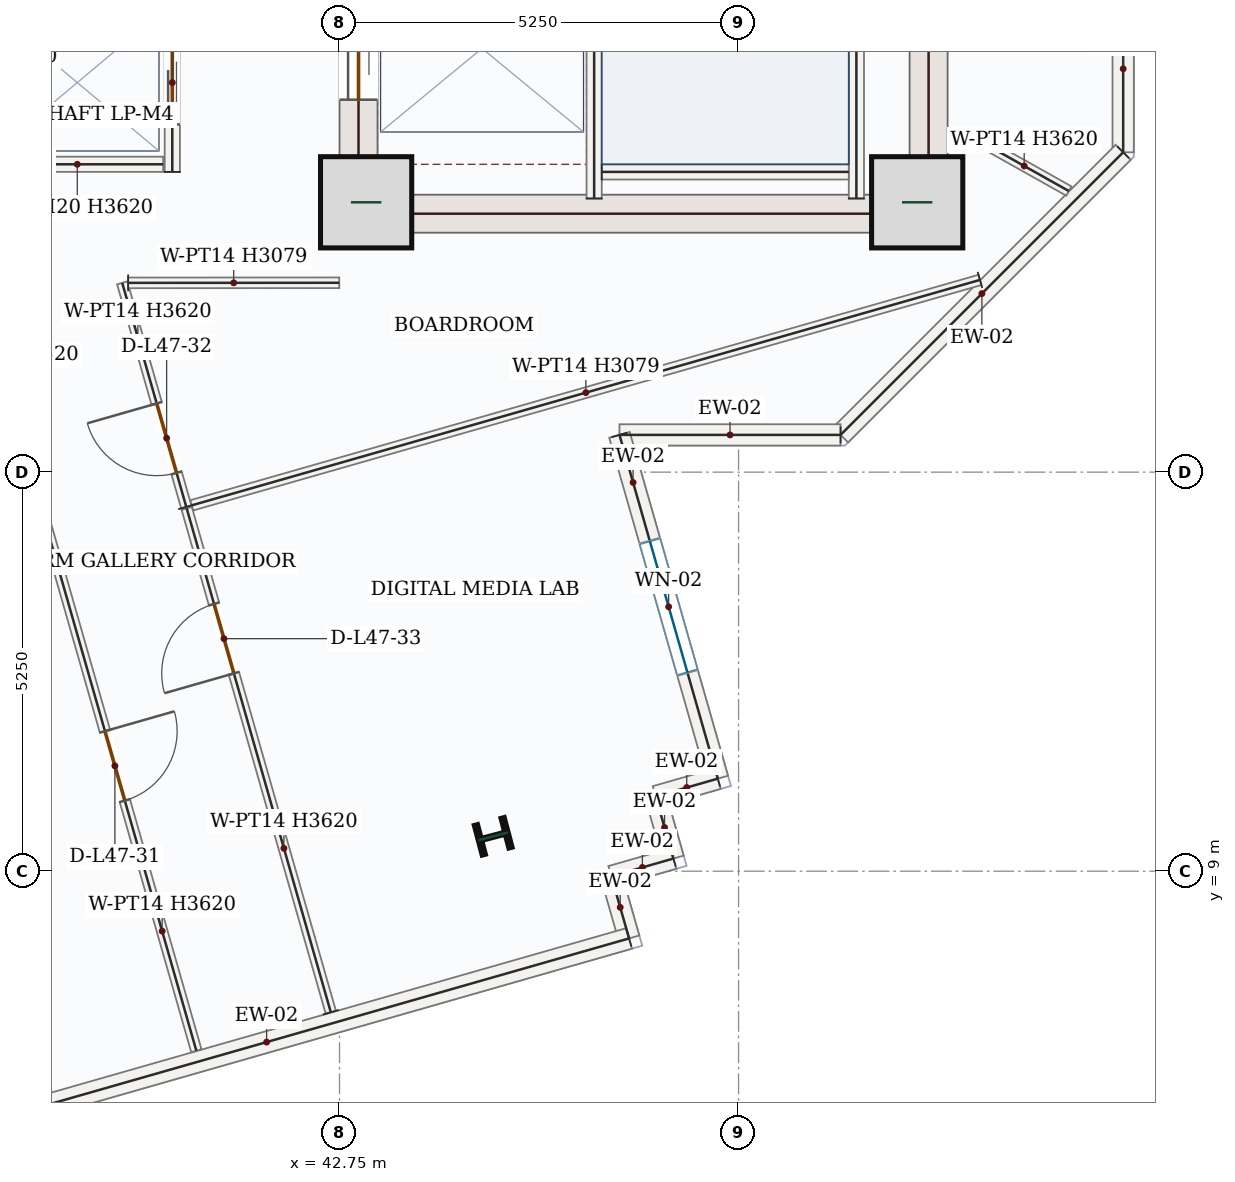
"""IFC4 building model, lengths in metres.
Left out: names, types, materials, properties, quantities, classifications, styles, units other than length and angle.
Written with IfcOpenShell. Run it as: python <this file> out.ifc"""

import sys

from ifc_helpers import new_model, si_unit, direction, frame, frame_2d, origin, origin_2d, place, context, subcontext, project, spatial, rectangle, i_section, extrude, source, transform, mapped, element, fill, save


model = new_model("IFC4")
c1 = context("Model", 3, precision=1e-05, world=origin(), true_north=direction((0.0, 1.0)))
c2 = subcontext(c1, "Body", "Model", "MODEL_VIEW")
j1 = project(units=[si_unit("LENGTHUNIT", "METRE"), si_unit("PLANEANGLEUNIT", "RADIAN")], contexts=[c1])
p1 = place(None, origin())
s1 = spatial("IfcSite", under=j1, at=p1, CompositionType="ELEMENT")
p2 = place(p1, origin())
s2 = spatial("IfcBuilding", under=s1, at=p2, CompositionType="ELEMENT")
p3 = place(p2, frame((0.0, 0.0, 201.9)))
s3 = spatial("IfcBuildingStorey", under=s2, at=p3, CompositionType="ELEMENT", Elevation=201.9)
p4 = place(p3, frame((43.0, 17.4, 0.0), z_axis=(0.0, 0.0, 1.0), x_axis=(0.0, 1.0, 0.0)))
e1 = element("IfcWall", 1, at=p4, inside=s3, PredefinedType="SHEAR", context=c2, shape_type="SweptSolid", body=[
    extrude(rectangle(XDim=8.55, YDim=0.5, at=frame_2d((4.275, 0.0))), origin(), (0.0, 0.0, 1.0), 3.62),
])
p5 = place(p4, frame((6.65, 0.0, 0.0)))
e2 = element("IfcOpeningElement", 2, at=p5, cuts=e1, PredefinedType="OPENING", context=c2, shape_type="SweptSolid", body=[
    extrude(rectangle(XDim=1.1, YDim=2.2, at=frame_2d((0.55, 1.1))), frame((0.0, 0.26, 0.0), z_axis=(0.0, -1.0, 0.0), x_axis=(1.0, 0.0, 0.0)), (0.0, 0.0, 1.0), 0.52),
])
p6 = place(p4, frame((1.75, 0.0, 0.0)))
e3 = element("IfcOpeningElement", 3, at=p6, cuts=e1, PredefinedType="OPENING", context=c2, shape_type="SweptSolid", body=[
    extrude(rectangle(XDim=1.3, YDim=2.2, at=frame_2d((0.65, 1.1))), frame((0.0, 0.26, 0.0), z_axis=(0.0, -1.0, 0.0), x_axis=(1.0, 0.0, 0.0)), (0.0, 0.0, 1.0), 0.52),
])
p7 = place(p4, frame((4.3, 0.0, 0.0)))
e4 = element("IfcOpeningElement", 4, at=p7, cuts=e1, PredefinedType="OPENING", context=c2, shape_type="SweptSolid", body=[
    extrude(rectangle(XDim=0.88, YDim=2.1, at=frame_2d((0.44, 1.05))), frame((0.0, 0.26, 0.0), z_axis=(0.0, -1.0, 0.0), x_axis=(1.0, 0.0, 0.0)), (0.0, 0.0, 1.0), 0.52),
])
m1 = source(origin(), c2, "Body", "SweptSolid", [
    extrude(rectangle(XDim=8.55, YDim=0.5, at=frame_2d((4.275, 0.0))), origin(), (0.0, 0.0, 1.0), 3.62),
])
p8 = place(p3, frame((50.5, 17.4, 0.0), z_axis=(0.0, 0.0, 1.0), x_axis=(0.0, 1.0, 0.0)))
e5 = element("IfcWall", 5, at=p8, inside=s3, PredefinedType="SHEAR", context=c2, shape_type="MappedRepresentation", body=[
    mapped(m1, transform((0.0, 0.0, 0.0), x_axis=(1.0, 0.0, 0.0), y_axis=(0.0, 1.0, 0.0), z_axis=(0.0, 0.0, 1.0), scale=1.0)),
])
m2 = source(origin(), c2, "Body", "SweptSolid", [
    extrude(rectangle(XDim=7.0, YDim=0.5, at=frame_2d((3.5, 0.0))), origin(), (0.0, 0.0, 1.0), 3.62),
])
p9 = place(p3, frame((43.25, 17.65, 0.0), z_axis=(0.0, 0.0, 1.0), x_axis=(1.0, 0.0, 0.0)))
e6 = element("IfcWall", 6, at=p9, inside=s3, PredefinedType="SHEAR", context=c2, shape_type="MappedRepresentation", body=[
    mapped(m2, transform((0.0, 0.0, 0.0), x_axis=(1.0, 0.0, 0.0), y_axis=(0.0, 1.0, 0.0), z_axis=(0.0, 0.0, 1.0), scale=1.0)),
])
m3 = source(origin(), c2, "Body", "SweptSolid", [
    extrude(rectangle(XDim=1.2, YDim=1.2, at=origin_2d()), origin(), (0.0, 0.0, 1.0), 3.9),
])
for number, where, z_axis, x_axis in (
    (7, (43.1, 17.8, 0.0), (0.0, 0.0, 1.0), (1.0, 0.0, 0.0)),
    (8, (50.35, 17.8, 0.0), (0.0, 0.0, 1.0), (1.0, 0.0, 0.0)),
):
    element("IfcColumn", number, at=place(p3, frame(where, z_axis=z_axis, x_axis=x_axis)), inside=s3, PredefinedType="COLUMN", context=c2, shape_type="MappedRepresentation", body=[
        mapped(m3, transform((0.0, 0.0, 0.0), x_axis=(1.0, 0.0, 0.0), y_axis=(0.0, 1.0, 0.0), z_axis=(0.0, 0.0, 1.0), scale=1.0)),
    ])
m4 = source(origin(), c2, "Body", "SweptSolid", [
    extrude(i_section(OverallWidth=0.404, OverallDepth=0.407, WebThickness=0.027, FlangeThickness=0.044, FilletRadius=0.018, at=origin_2d()), origin(), (0.0, 0.0, 1.0), 3.9),
])
p10 = place(p3, frame((44.772, 9.459, 0.0), z_axis=(0.0, 0.0, 1.0), x_axis=(-0.255445757936, 0.966823388604, 0.0)))
e9 = element("IfcColumn", 9, at=p10, inside=s3, PredefinedType="COLUMN", context=c2, shape_type="MappedRepresentation", body=[
    mapped(m4, transform((0.0, 0.0, 0.0), x_axis=(1.0, 0.0, 0.0), y_axis=(0.0, 1.0, 0.0), z_axis=(0.0, 0.0, 1.0), scale=1.0)),
])
p11 = place(p3, frame((53.06, 24.952, 0.0), z_axis=(0.0, 0.0, 1.0), x_axis=(0.0, -1.0, 0.0)))
e10 = element("IfcWall", 10, at=p11, inside=s3, PredefinedType="SOLIDWALL", context=c2, shape_type="SweptSolid", body=[
    extrude(rectangle(XDim=6.494, YDim=0.28, at=frame_2d((3.247, 0.0))), origin(), (0.0, 0.0, 1.0), 3.62),
])
p12 = place(p11, frame((2.347, 0.0, 0.85)))
e11 = element("IfcOpeningElement", 11, at=p12, cuts=e10, PredefinedType="OPENING", context=c2, shape_type="SweptSolid", body=[
    extrude(rectangle(XDim=1.8, YDim=1.75, at=frame_2d((0.9, 0.875))), frame((0.0, 0.15, 0.0), z_axis=(0.0, -1.0, 0.0), x_axis=(1.0, 0.0, 0.0)), (0.0, 0.0, 1.0), 0.3),
])
m5 = source(origin(), c2, "Body", "SweptSolid", [
    extrude(rectangle(XDim=5.258, YDim=0.28, at=frame_2d((2.629, 0.0))), origin(), (0.0, 0.0, 1.0), 3.62),
])
p13 = place(p3, frame((53.06, 18.458, 0.0), z_axis=(0.0, 0.0, 1.0), x_axis=(-0.707106781187, -0.707106781187, 0.0)))
e12 = element("IfcWall", 12, at=p13, inside=s3, PredefinedType="SOLIDWALL", context=c2, shape_type="MappedRepresentation", body=[
    mapped(m5, transform((0.0, 0.0, 0.0), x_axis=(1.0, 0.0, 0.0), y_axis=(0.0, 1.0, 0.0), z_axis=(0.0, 0.0, 1.0), scale=1.0)),
])
m6 = source(origin(), c2, "Body", "SweptSolid", [
    extrude(rectangle(XDim=2.909, YDim=0.28, at=frame_2d((1.455, 0.0))), origin(), (0.0, 0.0, 1.0), 3.62),
])
p14 = place(p3, frame((49.342, 14.74, 0.0), z_axis=(0.0, 0.0, 1.0), x_axis=(-1.0, 0.0, 0.0)))
e13 = element("IfcWall", 13, at=p14, inside=s3, PredefinedType="SOLIDWALL", context=c2, shape_type="MappedRepresentation", body=[
    mapped(m6, transform((0.0, 0.0, 0.0), x_axis=(1.0, 0.0, 0.0), y_axis=(0.0, 1.0, 0.0), z_axis=(0.0, 0.0, 1.0), scale=1.0)),
])
p15 = place(p3, frame((46.433, 14.74, 0.0), z_axis=(0.0, 0.0, 1.0), x_axis=(0.274981611661, -0.961449485542, 0.0)))
e14 = element("IfcWall", 14, at=p15, inside=s3, PredefinedType="SOLIDWALL", context=c2, shape_type="SweptSolid", body=[
    extrude(rectangle(XDim=4.704, YDim=0.28, at=frame_2d((2.352, 0.0))), origin(), (0.0, 0.0, 1.0), 3.62),
])
p16 = place(p15, frame((1.452, 0.0, 0.85)))
e15 = element("IfcOpeningElement", 15, at=p16, cuts=e14, PredefinedType="OPENING", context=c2, shape_type="SweptSolid", body=[
    extrude(rectangle(XDim=1.8, YDim=1.75, at=frame_2d((0.9, 0.875))), frame((0.0, 0.15, 0.0), z_axis=(0.0, -1.0, 0.0), x_axis=(1.0, 0.0, 0.0)), (0.0, 0.0, 1.0), 0.3),
])
m7 = source(origin(), c2, "Body", "SweptSolid", [
    extrude(rectangle(XDim=0.85, YDim=0.28, at=frame_2d((0.425, 0.0))), origin(), (0.0, 0.0, 1.0), 3.62),
])
p17 = place(p3, frame((47.727, 10.218, 0.0), z_axis=(0.0, 0.0, 1.0), x_axis=(-0.961469728335, -0.274910824624, 0.0)))
e16 = element("IfcWall", 16, at=p17, inside=s3, PredefinedType="SOLIDWALL", context=c2, shape_type="MappedRepresentation", body=[
    mapped(m7, transform((0.0, 0.0, 0.0), x_axis=(1.0, 0.0, 0.0), y_axis=(0.0, 1.0, 0.0), z_axis=(0.0, 0.0, 1.0), scale=1.0)),
])
m8 = source(origin(), c2, "Body", "SweptSolid", [
    extrude(rectangle(XDim=0.85, YDim=0.28, at=frame_2d((0.425, 0.0))), origin(), (0.0, 0.0, 1.0), 3.62),
])
p18 = place(p3, frame((46.909, 9.984, 0.0), z_axis=(0.0, 0.0, 1.0), x_axis=(0.274834915789, -0.961491429532, 0.0)))
e17 = element("IfcWall", 17, at=p18, inside=s3, PredefinedType="SOLIDWALL", context=c2, shape_type="MappedRepresentation", body=[
    mapped(m8, transform((0.0, 0.0, 0.0), x_axis=(1.0, 0.0, 0.0), y_axis=(0.0, 1.0, 0.0), z_axis=(0.0, 0.0, 1.0), scale=1.0)),
])
p19 = place(p3, frame((47.143, 9.167, 0.0), z_axis=(0.0, 0.0, 1.0), x_axis=(-0.961469728335, -0.274910824624, 0.0)))
e18 = element("IfcWall", 18, at=p19, inside=s3, PredefinedType="SOLIDWALL", context=c2, shape_type="MappedRepresentation", body=[
    mapped(m7, transform((0.0, 0.0, 0.0), x_axis=(1.0, 0.0, 0.0), y_axis=(0.0, 1.0, 0.0), z_axis=(0.0, 0.0, 1.0), scale=1.0)),
])
p20 = place(p3, frame((46.326, 8.933, 0.0), z_axis=(0.0, 0.0, 1.0), x_axis=(0.274834915789, -0.961491429532, 0.0)))
e19 = element("IfcWall", 19, at=p20, inside=s3, PredefinedType="SOLIDWALL", context=c2, shape_type="MappedRepresentation", body=[
    mapped(m8, transform((0.0, 0.0, 0.0), x_axis=(1.0, 0.0, 0.0), y_axis=(0.0, 1.0, 0.0), z_axis=(0.0, 0.0, 1.0), scale=1.0)),
])
m9 = source(origin(), c2, "Body", "SweptSolid", [
    extrude(rectangle(XDim=9.92, YDim=0.28, at=frame_2d((4.96, 0.0))), origin(), (0.0, 0.0, 1.0), 3.62),
])
p21 = place(p3, frame((46.56, 8.115, 0.0), z_axis=(0.0, 0.0, 1.0), x_axis=(-0.961457051276, -0.274955157346, 0.0)))
e20 = element("IfcWall", 20, at=p21, inside=s3, PredefinedType="SOLIDWALL", context=c2, shape_type="MappedRepresentation", body=[
    mapped(m9, transform((0.0, 0.0, 0.0), x_axis=(1.0, 0.0, 0.0), y_axis=(0.0, 1.0, 0.0), z_axis=(0.0, 0.0, 1.0), scale=1.0)),
])
m10 = source(origin(), c2, "Body", "SweptSolid", [
    extrude(rectangle(XDim=7.87, YDim=0.2, at=frame_2d((3.935, 0.0))), origin(), (0.0, 0.0, 1.0), 3.62),
])
p22 = place(p3, frame((49.55, 17.85, 0.0), z_axis=(0.0, 0.0, 1.0), x_axis=(0.0, 1.0, 0.0)))
e21 = element("IfcWall", 21, at=p22, inside=s3, PredefinedType="SOLIDWALL", context=c2, shape_type="MappedRepresentation", body=[
    mapped(m10, transform((0.0, 0.0, 0.0), x_axis=(1.0, 0.0, 0.0), y_axis=(0.0, 1.0, 0.0), z_axis=(0.0, 0.0, 1.0), scale=1.0)),
])
p23 = place(p3, frame((46.1, 17.85, 0.0), z_axis=(0.0, 0.0, 1.0), x_axis=(0.0, 1.0, 0.0)))
e22 = element("IfcWall", 22, at=p23, inside=s3, PredefinedType="SOLIDWALL", context=c2, shape_type="SweptSolid", body=[
    extrude(rectangle(XDim=8.0, YDim=0.2, at=frame_2d((4.0, 0.0))), origin(), (0.0, 0.0, 1.0), 3.62),
])
p24 = place(p23, frame((6.3, 0.0, 0.0)))
e23 = element("IfcOpeningElement", 23, at=p24, cuts=e22, PredefinedType="OPENING", context=c2, shape_type="SweptSolid", body=[
    extrude(rectangle(XDim=1.05, YDim=2.15, at=frame_2d((0.525, 1.075))), frame((0.0, 0.11, 0.0), z_axis=(0.0, -1.0, 0.0), x_axis=(1.0, 0.0, 0.0)), (0.0, 0.0, 1.0), 0.22),
])
m11 = source(origin(), c2, "Body", "SweptSolid", [
    extrude(rectangle(XDim=3.25, YDim=0.2, at=frame_2d((1.625, 0.0))), origin(), (0.0, 0.0, 1.0), 3.62),
])
p25 = place(p3, frame((46.2, 18.2, 0.0), z_axis=(0.0, 0.0, 1.0), x_axis=(1.0, 0.0, 0.0)))
e24 = element("IfcWall", 24, at=p25, inside=s3, PredefinedType="SOLIDWALL", context=c2, shape_type="MappedRepresentation", body=[
    mapped(m11, transform((0.0, 0.0, 0.0), x_axis=(1.0, 0.0, 0.0), y_axis=(0.0, 1.0, 0.0), z_axis=(0.0, 0.0, 1.0), scale=1.0)),
])
p26 = place(p3, frame((40.55, 18.2, 0.0), z_axis=(0.0, 0.0, 1.0), x_axis=(0.0, 1.0, 0.0)))
e25 = element("IfcWall", 25, at=p26, inside=s3, PredefinedType="SOLIDWALL", context=c2, shape_type="SweptSolid", body=[
    extrude(rectangle(XDim=2.35, YDim=0.2, at=frame_2d((1.175, 0.0))), origin(), (0.0, 0.0, 1.0), 3.62),
])
p27 = place(p26, frame((0.625, 0.0, 0.0)))
e26 = element("IfcOpeningElement", 26, at=p27, cuts=e25, PredefinedType="OPENING", context=c2, shape_type="SweptSolid", body=[
    extrude(rectangle(XDim=1.1, YDim=2.15, at=frame_2d((0.55, 1.075))), frame((0.0, 0.11, 0.0), z_axis=(0.0, -1.0, 0.0), x_axis=(1.0, 0.0, 0.0)), (0.0, 0.0, 1.0), 0.22),
])
m12 = source(origin(), c2, "Body", "SweptSolid", [
    extrude(rectangle(XDim=2.26, YDim=0.2, at=frame_2d((1.13, 0.0))), origin(), (0.0, 0.0, 1.0), 3.62),
])
p28 = place(p3, frame((38.17, 18.3, 0.0), z_axis=(0.0, 0.0, 1.0), x_axis=(1.0, 0.0, 0.0)))
e27 = element("IfcWall", 27, at=p28, inside=s3, PredefinedType="SOLIDWALL", context=c2, shape_type="MappedRepresentation", body=[
    mapped(m12, transform((0.0, 0.0, 0.0), x_axis=(1.0, 0.0, 0.0), y_axis=(0.0, 1.0, 0.0), z_axis=(0.0, 0.0, 1.0), scale=1.0)),
])
p29 = place(p3, frame((40.734, 13.792, 0.0), z_axis=(0.0, 0.0, 1.0), x_axis=(-0.274984067599, 0.961448783122, 0.0)))
e28 = element("IfcWall", 28, at=p29, inside=s3, PredefinedType="PARTITIONING", context=c2, shape_type="SweptSolid", body=[
    extrude(rectangle(XDim=3.066, YDim=0.14, at=frame_2d((1.533, 0.0))), origin(), (0.0, 0.0, 1.0), 3.62),
])
p30 = place(p29, frame((0.465, 0.0, 0.0)))
e29 = element("IfcOpeningElement", 29, at=p30, cuts=e28, PredefinedType="OPENING", context=c2, shape_type="SweptSolid", body=[
    extrude(rectangle(XDim=0.95, YDim=2.15, at=frame_2d((0.475, 1.075))), frame((0.0, 0.08, 0.0), z_axis=(0.0, -1.0, 0.0), x_axis=(1.0, 0.0, 0.0)), (0.0, 0.0, 1.0), 0.16),
])
m13 = source(origin(), c2, "Body", "SweptSolid", [
    extrude(rectangle(XDim=2.778, YDim=0.14, at=frame_2d((1.389, 0.0))), origin(), (0.0, 0.0, 1.0), 3.079),
])
p31 = place(p3, frame((39.969, 16.74, 0.0), z_axis=(0.0, 0.0, 1.0), x_axis=(0.999999903427, 0.000439483125, 0.0)))
e30 = element("IfcWall", 30, at=p31, inside=s3, PredefinedType="PARTITIONING", context=c2, shape_type="MappedRepresentation", body=[
    mapped(m13, transform((0.0, 0.0, 0.0), x_axis=(1.0, 0.0, 0.0), y_axis=(0.0, 1.0, 0.0), z_axis=(0.0, 0.0, 1.0), scale=1.0)),
])
m14 = source(origin(), c2, "Body", "SweptSolid", [
    extrude(rectangle(XDim=1.348, YDim=0.14, at=frame_2d((0.674, 0.0))), origin(), (0.0, 0.0, 1.0), 3.62),
])
p32 = place(p3, frame((51.17, 18.608, 0.0), z_axis=(0.0, 0.0, 1.0), x_axis=(0.872029904913, -0.489452597232, 0.0)))
e31 = element("IfcWall", 31, at=p32, inside=s3, PredefinedType="PARTITIONING", context=c2, shape_type="MappedRepresentation", body=[
    mapped(m14, transform((0.0, 0.0, 0.0), x_axis=(1.0, 0.0, 0.0), y_axis=(0.0, 1.0, 0.0), z_axis=(0.0, 0.0, 1.0), scale=1.0)),
])
m15 = source(origin(), c2, "Body", "SweptSolid", [
    extrude(rectangle(XDim=10.785, YDim=0.14, at=frame_2d((5.393, 0.0))), origin(), (0.0, 0.0, 1.0), 3.079),
])
p33 = place(p3, frame((51.176, 16.779, 0.0), z_axis=(0.0, 0.0, 1.0), x_axis=(-0.961454726908, -0.274963285016, 0.0)))
e32 = element("IfcWall", 32, at=p33, inside=s3, PredefinedType="PARTITIONING", context=c2, shape_type="MappedRepresentation", body=[
    mapped(m15, transform((0.0, 0.0, 0.0), x_axis=(1.0, 0.0, 0.0), y_axis=(0.0, 1.0, 0.0), z_axis=(0.0, 0.0, 1.0), scale=1.0)),
])
p34 = place(p3, frame((42.635, 7.144, 0.0), z_axis=(0.0, 0.0, 1.0), x_axis=(-0.274973646468, 0.96145176361, 0.0)))
e33 = element("IfcWall", 33, at=p34, inside=s3, PredefinedType="PARTITIONING", context=c2, shape_type="SweptSolid", body=[
    extrude(rectangle(XDim=6.895, YDim=0.14, at=frame_2d((3.448, 0.0))), origin(), (0.0, 0.0, 1.0), 3.62),
])
p35 = place(p34, frame((4.637, 0.0, 0.0)))
e34 = element("IfcOpeningElement", 34, at=p35, cuts=e33, PredefinedType="OPENING", context=c2, shape_type="SweptSolid", body=[
    extrude(rectangle(XDim=0.95, YDim=2.15, at=frame_2d((0.475, 1.075))), frame((0.0, 0.08, 0.0), z_axis=(0.0, -1.0, 0.0), x_axis=(1.0, 0.0, 0.0)), (0.0, 0.0, 1.0), 0.16),
])
p36 = place(p3, frame((38.723, 14.133, 0.0), z_axis=(0.0, 0.0, 1.0), x_axis=(0.274985856522, -0.96144827147, 0.0)))
e35 = element("IfcWall", 35, at=p36, inside=s3, PredefinedType="PARTITIONING", context=c2, shape_type="SweptSolid", body=[
    extrude(rectangle(XDim=7.795, YDim=0.14, at=frame_2d((3.897, 0.0))), origin(), (0.0, 0.0, 1.0), 3.62),
])
p37 = place(p36, frame((3.423, 0.0, 0.0)))
e36 = element("IfcOpeningElement", 36, at=p37, cuts=e35, PredefinedType="OPENING", context=c2, shape_type="SweptSolid", body=[
    extrude(rectangle(XDim=0.95, YDim=2.15, at=frame_2d((0.475, 1.075))), frame((0.0, 0.08, 0.0), z_axis=(0.0, -1.0, 0.0), x_axis=(1.0, 0.0, 0.0)), (0.0, 0.0, 1.0), 0.16),
])
m16 = source(origin(), c2, "Body", "SweptSolid", [
    extrude(rectangle(XDim=1.8, YDim=1.75, at=frame_2d((0.9, 0.875))), frame((0.0, 0.03, 0.0), z_axis=(0.0, -1.0, 0.0), x_axis=(1.0, 0.0, 0.0)), (0.0, 0.0, 1.0), 0.06),
])
p38 = place(p16, origin())
e37 = element("IfcWindow", 37, at=p38, inside=s3, PartitioningType="DOUBLE_PANEL_VERTICAL", PredefinedType="WINDOW", context=c2, shape_type="MappedRepresentation", body=[
    mapped(m16, transform((0.0, 0.0, 0.0), x_axis=(1.0, 0.0, 0.0), y_axis=(0.0, 1.0, 0.0), z_axis=(0.0, 0.0, 1.0), scale=1.0)),
])
fill(e15, e37)
m17 = source(origin(), c2, "Body", "SweptSolid", [
    extrude(rectangle(XDim=1.3, YDim=2.2, at=frame_2d((0.65, 1.1))), frame((0.0, 0.025, 0.0), z_axis=(0.0, -1.0, 0.0), x_axis=(1.0, 0.0, 0.0)), (0.0, 0.0, 1.0), 0.05),
])
p39 = place(p6, origin())
e38 = element("IfcDoor", 38, at=p39, inside=s3, OperationType="DOUBLE_DOOR_SLIDING", PredefinedType="DOOR", context=c2, shape_type="MappedRepresentation", body=[
    mapped(m17, transform((0.0, 0.0, 0.0), x_axis=(1.0, 0.0, 0.0), y_axis=(0.0, 1.0, 0.0), z_axis=(0.0, 0.0, 1.0), scale=1.0)),
])
fill(e3, e38)
m18 = source(origin(), c2, "Body", "SweptSolid", [
    extrude(rectangle(XDim=1.1, YDim=2.15, at=frame_2d((0.55, 1.075))), frame((0.0, 0.025, 0.0), z_axis=(0.0, -1.0, 0.0), x_axis=(1.0, 0.0, 0.0)), (0.0, 0.0, 1.0), 0.05),
])
p40 = place(p27, origin())
e39 = element("IfcDoor", 39, at=p40, inside=s3, OperationType="DOUBLE_DOOR_SLIDING", PredefinedType="DOOR", context=c2, shape_type="MappedRepresentation", body=[
    mapped(m18, transform((0.0, 0.0, 0.0), x_axis=(1.0, 0.0, 0.0), y_axis=(0.0, 1.0, 0.0), z_axis=(0.0, 0.0, 1.0), scale=1.0)),
])
fill(e26, e39)
m19 = source(origin(), c2, "Body", "SweptSolid", [
    extrude(rectangle(XDim=0.95, YDim=2.15, at=frame_2d((0.475, 1.075))), frame((0.0, 0.025, 0.0), z_axis=(0.0, -1.0, 0.0), x_axis=(1.0, 0.0, 0.0)), (0.0, 0.0, 1.0), 0.05),
])
p41 = place(p37, origin())
e40 = element("IfcDoor", 40, at=p41, inside=s3, OperationType="SINGLE_SWING_LEFT", PredefinedType="DOOR", context=c2, shape_type="MappedRepresentation", body=[
    mapped(m19, transform((0.0, 0.0, 0.0), x_axis=(1.0, 0.0, 0.0), y_axis=(0.0, 1.0, 0.0), z_axis=(0.0, 0.0, 1.0), scale=1.0)),
])
fill(e36, e40)
p42 = place(p30, origin())
e41 = element("IfcDoor", 41, at=p42, inside=s3, OperationType="SINGLE_SWING_RIGHT", PredefinedType="DOOR", context=c2, shape_type="MappedRepresentation", body=[
    mapped(m19, transform((0.0, 0.0, 0.0), x_axis=(1.0, 0.0, 0.0), y_axis=(0.0, 1.0, 0.0), z_axis=(0.0, 0.0, 1.0), scale=1.0)),
])
fill(e29, e41)
p43 = place(p35, origin())
e42 = element("IfcDoor", 42, at=p43, inside=s3, OperationType="SINGLE_SWING_LEFT", PredefinedType="DOOR", context=c2, shape_type="MappedRepresentation", body=[
    mapped(m19, transform((0.0, 0.0, 0.0), x_axis=(1.0, 0.0, 0.0), y_axis=(0.0, 1.0, 0.0), z_axis=(0.0, 0.0, 1.0), scale=1.0)),
])
fill(e34, e42)
save(model, sys.argv[1])
